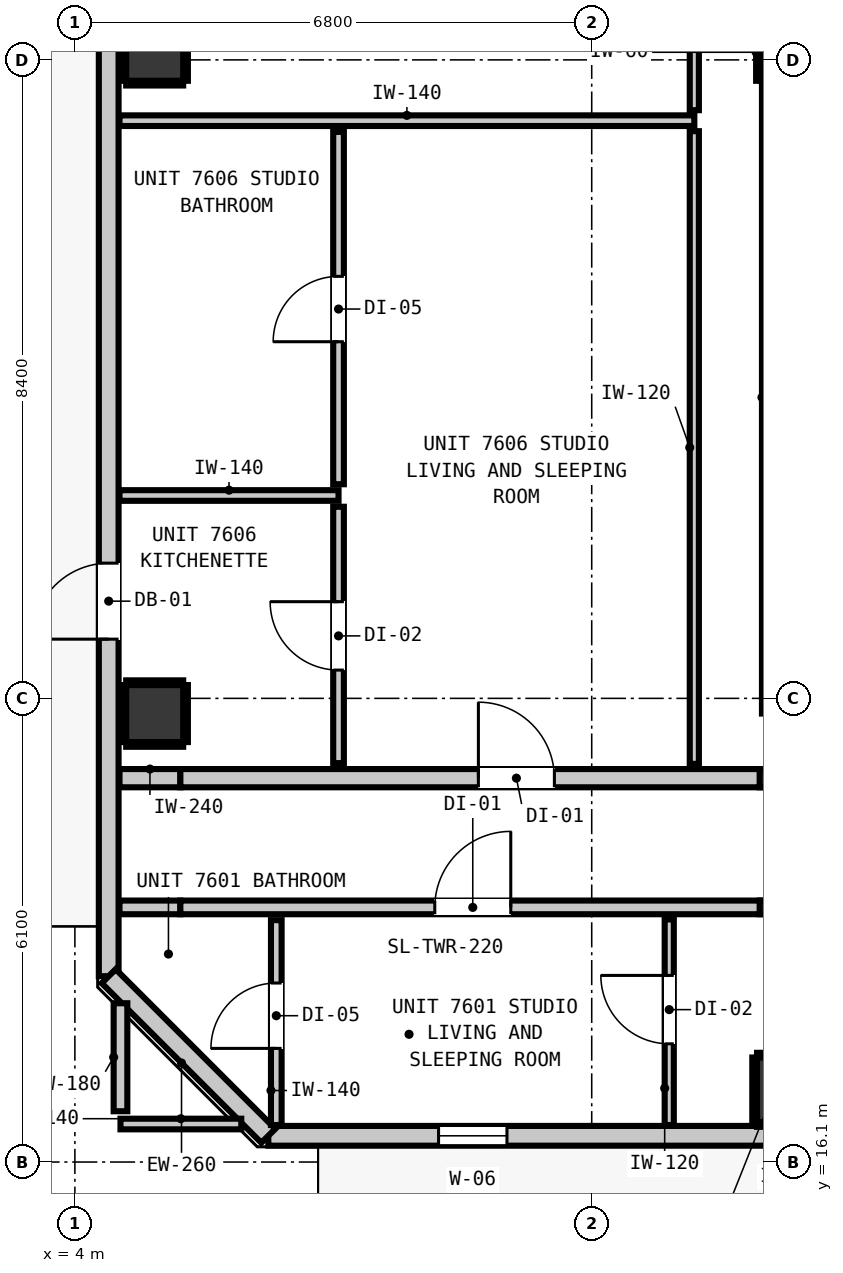
"""IFC4 building model, lengths in metres.
Left out: names, types, materials, properties, quantities, classifications, styles, units other than length and angle.
Written with IfcOpenShell. Run it as: python <this file> out.ifc"""

import sys

from ifc_helpers import new_model, si_unit, direction, frame, frame_2d, origin, origin_2d, place, context, subcontext, project, spatial, rectangle, extrude, element, fill, save


model = new_model("IFC4")
c1 = context("Model", 3, precision=1e-05, world=origin(), true_north=direction((0.0, 1.0)))
c2 = subcontext(c1, "Body", "Model", "MODEL_VIEW")
j1 = project(units=[si_unit("LENGTHUNIT", "METRE"), si_unit("PLANEANGLEUNIT", "RADIAN")], contexts=[c1])
p1 = place(None, origin())
s1 = spatial("IfcSite", under=j1, at=p1, CompositionType="ELEMENT")
p2 = place(p1, origin())
s2 = spatial("IfcBuilding", under=s1, at=p2, CompositionType="ELEMENT")
p3 = place(p2, frame((0.0, 0.0, 262.24)))
s3 = spatial("IfcBuildingStorey", under=s2, at=p3, CompositionType="ELEMENT", Elevation=262.24)
p4 = place(p3, frame((13.4, 30.7, 0.0), z_axis=(0.0, 0.0, 1.0), x_axis=(1.0, 0.0, 0.0)))
e1 = element("IfcColumn", 1, at=p4, inside=s3, PredefinedType="COLUMN", context=c2, shape_type="SweptSolid", body=[
    extrude(rectangle(XDim=0.75, YDim=0.75, at=origin_2d()), origin(), (0.0, 0.0, 1.0), 3.32),
])
p5 = place(p3, frame((13.44, 22.0, 0.0), z_axis=(0.0, 0.0, 1.0), x_axis=(0.0, 1.0, 0.0)))
e2 = element("IfcWall", 2, at=p5, inside=s3, PredefinedType="SHEAR", context=c2, shape_type="SweptSolid", body=[
    extrude(rectangle(XDim=8.32, YDim=0.8, at=frame_2d((4.16, 0.0))), origin(), (0.0, 0.0, 1.0), 3.32),
])
p6 = place(p3, frame((13.4, 17.05, 0.0), z_axis=(0.0, 0.0, 1.0), x_axis=(1.0, 0.0, 0.0)))
e3 = element("IfcColumn", 3, at=p6, inside=s3, PredefinedType="COLUMN", context=c2, shape_type="SweptSolid", body=[
    extrude(rectangle(XDim=0.85, YDim=0.85, at=origin_2d()), origin(), (0.0, 0.0, 1.0), 3.32),
])
for number, where, z_axis, x_axis in (
    (4, (5.05, 22.0, 0.0), (0.0, 0.0, 1.0), (1.0, 0.0, 0.0)),
    (5, (5.05, 30.7, 0.0), (0.0, 0.0, 1.0), (1.0, 0.0, 0.0)),
):
    element("IfcColumn", number, at=place(p3, frame(where, z_axis=z_axis, x_axis=x_axis)), inside=s3, PredefinedType="COLUMN", context=c2, shape_type="SweptSolid", body=[
        extrude(rectangle(XDim=0.75, YDim=0.75, at=origin_2d()), origin(), (0.0, 0.0, 1.0), 3.32),
    ])
p7 = place(p3, frame((4.445, 18.545, 0.0), z_axis=(0.0, 0.0, 1.0), x_axis=(0.0, 1.0, 0.0)))
e6 = element("IfcWall", 6, at=p7, inside=s3, PredefinedType="STANDARD", context=c2, shape_type="SweptSolid", body=[
    extrude(rectangle(XDim=30.31, YDim=0.26, at=frame_2d((15.155, 0.0))), origin(), (0.0, 0.0, 1.0), 3.1),
])
p8 = place(p7, frame((4.434, 0.0, 0.0)))
e7 = element("IfcOpeningElement", 7, at=p8, cuts=e6, PredefinedType="OPENING", context=c2, shape_type="SweptSolid", body=[
    extrude(rectangle(XDim=1.0, YDim=2.15, at=frame_2d((0.5, 1.075))), frame((0.0, 0.14, 0.0), z_axis=(0.0, -1.0, 0.0), x_axis=(1.0, 0.0, 0.0)), (0.0, 0.0, 1.0), 0.28),
])
p9 = place(p7, frame((28.316, 0.0, 0.85)))
e8 = element("IfcOpeningElement", 8, at=p9, cuts=e6, PredefinedType="OPENING", context=c2, shape_type="SweptSolid", body=[
    extrude(rectangle(XDim=0.9, YDim=1.5, at=frame_2d((0.45, 0.75))), frame((0.0, 0.14, 0.0), z_axis=(0.0, -1.0, 0.0), x_axis=(1.0, 0.0, 0.0)), (0.0, 0.0, 1.0), 0.28),
])
p10 = place(p7, frame((16.055, 0.0, 0.85)))
e9 = element("IfcOpeningElement", 9, at=p10, cuts=e6, PredefinedType="OPENING", context=c2, shape_type="SweptSolid", body=[
    extrude(rectangle(XDim=0.9, YDim=1.5, at=frame_2d((0.45, 0.75))), frame((0.0, 0.14, 0.0), z_axis=(0.0, -1.0, 0.0), x_axis=(1.0, 0.0, 0.0)), (0.0, 0.0, 1.0), 0.28),
])
p11 = place(p3, frame((39.255, 16.445, 0.0), z_axis=(0.0, 0.0, 1.0), x_axis=(-1.0, 0.0, 0.0)))
e10 = element("IfcWall", 10, at=p11, inside=s3, PredefinedType="STANDARD", context=c2, shape_type="SweptSolid", body=[
    extrude(rectangle(XDim=32.71, YDim=0.26, at=frame_2d((16.355, 0.0))), origin(), (0.0, 0.0, 1.0), 3.1),
])
p12 = place(p11, frame((0.907, 0.0, 0.0)))
e11 = element("IfcOpeningElement", 11, at=p12, cuts=e10, PredefinedType="OPENING", context=c2, shape_type="SweptSolid", body=[
    extrude(rectangle(XDim=1.0, YDim=2.15, at=frame_2d((0.5, 1.075))), frame((0.0, 0.14, 0.0), z_axis=(0.0, -1.0, 0.0), x_axis=(1.0, 0.0, 0.0)), (0.0, 0.0, 1.0), 0.28),
])
p13 = place(p11, frame((29.57, 0.0, 0.85)))
e12 = element("IfcOpeningElement", 12, at=p13, cuts=e10, PredefinedType="OPENING", context=c2, shape_type="SweptSolid", body=[
    extrude(rectangle(XDim=0.9, YDim=1.5, at=frame_2d((0.45, 0.75))), frame((0.0, 0.14, 0.0), z_axis=(0.0, -1.0, 0.0), x_axis=(1.0, 0.0, 0.0)), (0.0, 0.0, 1.0), 0.28),
])
p14 = place(p11, frame((15.558, 0.0, 0.85)))
e13 = element("IfcOpeningElement", 13, at=p14, cuts=e10, PredefinedType="OPENING", context=c2, shape_type="SweptSolid", body=[
    extrude(rectangle(XDim=0.9, YDim=1.5, at=frame_2d((0.45, 0.75))), frame((0.0, 0.14, 0.0), z_axis=(0.0, -1.0, 0.0), x_axis=(1.0, 0.0, 0.0)), (0.0, 0.0, 1.0), 0.28),
])
p15 = place(p11, frame((5.328, 0.0, 0.85)))
e14 = element("IfcOpeningElement", 14, at=p15, cuts=e10, PredefinedType="OPENING", context=c2, shape_type="SweptSolid", body=[
    extrude(rectangle(XDim=0.9, YDim=1.5, at=frame_2d((0.45, 0.75))), frame((0.0, 0.14, 0.0), z_axis=(0.0, -1.0, 0.0), x_axis=(1.0, 0.0, 0.0)), (0.0, 0.0, 1.0), 0.28),
])
p16 = place(p3, frame((6.545, 16.445, 0.0), z_axis=(0.0, 0.0, 1.0), x_axis=(-0.707106781187, 0.707106781187, 0.0)))
e15 = element("IfcWall", 15, at=p16, inside=s3, PredefinedType="STANDARD", context=c2, shape_type="SweptSolid", body=[
    extrude(rectangle(XDim=2.97, YDim=0.26, at=frame_2d((1.485, 0.0))), origin(), (0.0, 0.0, 1.0), 3.1),
])
p17 = place(p3, frame((4.587, 21.15, 0.0), z_axis=(0.0, 0.0, 1.0), x_axis=(1.0, 0.0, 0.0)))
e16 = element("IfcWall", 16, at=p17, inside=s3, PredefinedType="PARTITIONING", context=c2, shape_type="SweptSolid", body=[
    extrude(rectangle(XDim=0.801, YDim=0.24, at=frame_2d((0.4, 0.0))), origin(), (0.0, 0.0, 1.0), 3.1),
])
p18 = place(p3, frame((5.388, 21.15, 0.0), z_axis=(0.0, 0.0, 1.0), x_axis=(1.0, 0.0, 0.0)))
e17 = element("IfcWall", 17, at=p18, inside=s3, PredefinedType="PARTITIONING", context=c2, shape_type="SweptSolid", body=[
    extrude(rectangle(XDim=7.624, YDim=0.24, at=frame_2d((3.812, 0.0))), origin(), (0.0, 0.0, 1.0), 2.477),
])
p19 = place(p18, frame((3.921, 0.0, 0.0)))
e18 = element("IfcOpeningElement", 18, at=p19, cuts=e17, PredefinedType="OPENING", context=c2, shape_type="SweptSolid", body=[
    extrude(rectangle(XDim=1.0, YDim=2.15, at=frame_2d((0.5, 1.075))), frame((0.0, 0.13, 0.0), z_axis=(0.0, -1.0, 0.0), x_axis=(1.0, 0.0, 0.0)), (0.0, 0.0, 1.0), 0.26),
])
p20 = place(p3, frame((13.012, 21.15, 0.0), z_axis=(0.0, 0.0, 1.0), x_axis=(1.0, 0.0, 0.0)))
e19 = element("IfcWall", 19, at=p20, inside=s3, PredefinedType="PARTITIONING", context=c2, shape_type="SweptSolid", body=[
    extrude(rectangle(XDim=28.201, YDim=0.24, at=frame_2d((14.101, 0.0))), origin(), (0.0, 0.0, 1.0), 3.1),
])
p21 = place(p20, frame((5.198, 0.0, 0.0)))
e20 = element("IfcOpeningElement", 20, at=p21, cuts=e19, PredefinedType="OPENING", context=c2, shape_type="SweptSolid", body=[
    extrude(rectangle(XDim=1.1, YDim=2.15, at=frame_2d((0.55, 1.075))), frame((0.0, 0.13, 0.0), z_axis=(0.0, -1.0, 0.0), x_axis=(1.0, 0.0, 0.0)), (0.0, 0.0, 1.0), 0.26),
])
p22 = place(p3, frame((4.587, 19.45, 0.0), z_axis=(0.0, 0.0, 1.0), x_axis=(1.0, 0.0, 0.0)))
e21 = element("IfcWall", 21, at=p22, inside=s3, PredefinedType="PARTITIONING", context=c2, shape_type="SweptSolid", body=[
    extrude(rectangle(XDim=0.801, YDim=0.18, at=frame_2d((0.4, 0.0))), origin(), (0.0, 0.0, 1.0), 3.1),
])
p23 = place(p3, frame((5.388, 19.45, 0.0), z_axis=(0.0, 0.0, 1.0), x_axis=(1.0, 0.0, 0.0)))
e22 = element("IfcWall", 22, at=p23, inside=s3, PredefinedType="PARTITIONING", context=c2, shape_type="SweptSolid", body=[
    extrude(rectangle(XDim=7.624, YDim=0.18, at=frame_2d((3.812, 0.0))), origin(), (0.0, 0.0, 1.0), 2.477),
])
p24 = place(p23, frame((3.347, 0.0, 0.0)))
e23 = element("IfcOpeningElement", 23, at=p24, cuts=e22, PredefinedType="OPENING", context=c2, shape_type="SweptSolid", body=[
    extrude(rectangle(XDim=1.0, YDim=2.15, at=frame_2d((0.5, 1.075))), frame((0.0, 0.1, 0.0), z_axis=(0.0, -1.0, 0.0), x_axis=(1.0, 0.0, 0.0)), (0.0, 0.0, 1.0), 0.2),
])
p25 = place(p3, frame((13.012, 19.45, 0.0), z_axis=(0.0, 0.0, 1.0), x_axis=(1.0, 0.0, 0.0)))
e24 = element("IfcWall", 24, at=p25, inside=s3, PredefinedType="PARTITIONING", context=c2, shape_type="SweptSolid", body=[
    extrude(rectangle(XDim=28.201, YDim=0.18, at=frame_2d((14.101, 0.0))), origin(), (0.0, 0.0, 1.0), 3.1),
])
p26 = place(p25, frame((8.329, 0.0, 0.0)))
e25 = element("IfcOpeningElement", 25, at=p26, cuts=e24, PredefinedType="OPENING", context=c2, shape_type="SweptSolid", body=[
    extrude(rectangle(XDim=1.0, YDim=2.15, at=frame_2d((0.5, 1.075))), frame((0.0, 0.1, 0.0), z_axis=(0.0, -1.0, 0.0), x_axis=(1.0, 0.0, 0.0)), (0.0, 0.0, 1.0), 0.2),
])
p27 = place(p25, frame((21.403, 0.0, 0.0)))
e26 = element("IfcOpeningElement", 26, at=p27, cuts=e24, PredefinedType="OPENING", context=c2, shape_type="SweptSolid", body=[
    extrude(rectangle(XDim=1.0, YDim=2.15, at=frame_2d((0.5, 1.075))), frame((0.0, 0.1, 0.0), z_axis=(0.0, -1.0, 0.0), x_axis=(1.0, 0.0, 0.0)), (0.0, 0.0, 1.0), 0.2),
])
p28 = place(p3, frame((4.6, 16.6, 0.0), z_axis=(0.0, 0.0, 1.0), x_axis=(1.0, 0.0, 0.0)))
e27 = element("IfcWall", 27, at=p28, inside=s3, PredefinedType="PARTITIONING", context=c2, shape_type="SweptSolid", body=[
    extrude(rectangle(XDim=1.589, YDim=0.14, at=frame_2d((0.794, 0.0))), origin(), (0.0, 0.0, 1.0), 3.1),
])
p29 = place(p3, frame((4.587, 24.869, 0.0), z_axis=(0.0, 0.0, 1.0), x_axis=(1.0, 0.0, 0.0)))
e28 = element("IfcWall", 28, at=p29, inside=s3, PredefinedType="PARTITIONING", context=c2, shape_type="SweptSolid", body=[
    extrude(rectangle(XDim=2.882, YDim=0.14, at=frame_2d((1.441, 0.0))), origin(), (0.0, 0.0, 1.0), 3.1),
])
p30 = place(p3, frame((4.587, 29.8, 0.0), z_axis=(0.0, 0.0, 1.0), x_axis=(1.0, 0.0, 0.0)))
e29 = element("IfcWall", 29, at=p30, inside=s3, PredefinedType="PARTITIONING", context=c2, shape_type="SweptSolid", body=[
    extrude(rectangle(XDim=7.563, YDim=0.14, at=frame_2d((3.781, 0.0))), origin(), (0.0, 0.0, 1.0), 3.1),
])
p31 = place(p3, frame((4.6, 16.768, 0.0), z_axis=(0.0, 0.0, 1.0), x_axis=(0.0, 1.0, 0.0)))
e30 = element("IfcWall", 30, at=p31, inside=s3, PredefinedType="PARTITIONING", context=c2, shape_type="SweptSolid", body=[
    extrude(rectangle(XDim=1.421, YDim=0.18, at=frame_2d((0.71, 0.0))), origin(), (0.0, 0.0, 1.0), 3.1),
])
p32 = place(p3, frame((6.65, 16.587, 0.0), z_axis=(0.0, 0.0, 1.0), x_axis=(0.0, 1.0, 0.0)))
e31 = element("IfcWall", 31, at=p32, inside=s3, PredefinedType="PARTITIONING", context=c2, shape_type="SweptSolid", body=[
    extrude(rectangle(XDim=2.695, YDim=0.14, at=frame_2d((1.348, 0.0))), origin(), (0.0, 0.0, 1.0), 3.1),
])
p33 = place(p32, frame((1.008, 0.0, 0.0)))
e32 = element("IfcOpeningElement", 32, at=p33, cuts=e31, PredefinedType="OPENING", context=c2, shape_type="SweptSolid", body=[
    extrude(rectangle(XDim=0.86, YDim=2.02, at=frame_2d((0.43, 1.01))), frame((0.0, 0.08, 0.0), z_axis=(0.0, -1.0, 0.0), x_axis=(1.0, 0.0, 0.0)), (0.0, 0.0, 1.0), 0.16),
])
p34 = place(p3, frame((7.469, 21.348, 0.0), z_axis=(0.0, 0.0, 1.0), x_axis=(0.0, 1.0, 0.0)))
e33 = element("IfcWall", 33, at=p34, inside=s3, PredefinedType="PARTITIONING", context=c2, shape_type="SweptSolid", body=[
    extrude(rectangle(XDim=3.373, YDim=0.14, at=frame_2d((1.687, 0.0))), origin(), (0.0, 0.0, 1.0), 3.1),
])
p35 = place(p34, frame((1.224, 0.0, 0.0)))
e34 = element("IfcOpeningElement", 34, at=p35, cuts=e33, PredefinedType="OPENING", context=c2, shape_type="SweptSolid", body=[
    extrude(rectangle(XDim=0.9, YDim=2.1, at=frame_2d((0.45, 1.05))), frame((0.0, 0.08, 0.0), z_axis=(0.0, -1.0, 0.0), x_axis=(1.0, 0.0, 0.0)), (0.0, 0.0, 1.0), 0.16),
])
p36 = place(p3, frame((7.469, 25.017, 0.0), z_axis=(0.0, 0.0, 1.0), x_axis=(0.0, 1.0, 0.0)))
e35 = element("IfcWall", 35, at=p36, inside=s3, PredefinedType="PARTITIONING", context=c2, shape_type="SweptSolid", body=[
    extrude(rectangle(XDim=4.635, YDim=0.14, at=frame_2d((2.317, 0.0))), origin(), (0.0, 0.0, 1.0), 3.1),
])
p37 = place(p36, frame((1.875, 0.0, 0.0)))
e36 = element("IfcOpeningElement", 36, at=p37, cuts=e35, PredefinedType="OPENING", context=c2, shape_type="SweptSolid", body=[
    extrude(rectangle(XDim=0.86, YDim=2.02, at=frame_2d((0.43, 1.01))), frame((0.0, 0.08, 0.0), z_axis=(0.0, -1.0, 0.0), x_axis=(1.0, 0.0, 0.0)), (0.0, 0.0, 1.0), 0.16),
])
p38 = place(p3, frame((11.82, 16.587, 0.0), z_axis=(0.0, 0.0, 1.0), x_axis=(0.0, 1.0, 0.0)))
e37 = element("IfcWall", 37, at=p38, inside=s3, PredefinedType="PARTITIONING", context=c2, shape_type="SweptSolid", body=[
    extrude(rectangle(XDim=2.705, YDim=0.12, at=frame_2d((1.353, 0.0))), origin(), (0.0, 0.0, 1.0), 3.1),
])
p39 = place(p38, frame((1.068, 0.0, 0.0)))
e38 = element("IfcOpeningElement", 38, at=p39, cuts=e37, PredefinedType="OPENING", context=c2, shape_type="SweptSolid", body=[
    extrude(rectangle(XDim=0.9, YDim=2.1, at=frame_2d((0.45, 1.05))), frame((0.0, 0.07, 0.0), z_axis=(0.0, -1.0, 0.0), x_axis=(1.0, 0.0, 0.0)), (0.0, 0.0, 1.0), 0.14),
])
p40 = place(p3, frame((12.15, 21.338, 0.0), z_axis=(0.0, 0.0, 1.0), x_axis=(0.0, 1.0, 0.0)))
e39 = element("IfcWall", 39, at=p40, inside=s3, PredefinedType="PARTITIONING", context=c2, shape_type="SweptSolid", body=[
    extrude(rectangle(XDim=8.324, YDim=0.12, at=frame_2d((4.162, 0.0))), origin(), (0.0, 0.0, 1.0), 3.1),
])
p41 = place(p3, frame((12.15, 29.938, 0.0), z_axis=(0.0, 0.0, 1.0), x_axis=(0.0, 1.0, 0.0)))
e40 = element("IfcWall", 40, at=p41, inside=s3, PredefinedType="PARTITIONING", context=c2, shape_type="SweptSolid", body=[
    extrude(rectangle(XDim=10.154, YDim=0.12, at=frame_2d((5.077, 0.0))), origin(), (0.0, 0.0, 1.0), 3.1),
])
p42 = place(p3, frame((12.993, 30.325, 0.0), z_axis=(0.0, 0.0, 1.0), x_axis=(0.0, 1.0, 0.0)))
e41 = element("IfcWall", 41, at=p42, inside=s3, PredefinedType="PARTITIONING", context=c2, shape_type="SweptSolid", body=[
    extrude(rectangle(XDim=0.75, YDim=0.06, at=frame_2d((0.375, 0.0))), origin(), (0.0, 0.0, 1.0), 1.45),
])
for number, where, z_axis, x_axis in (
    (42, (12.975, 16.593, 0.0), (0.0, 0.0, 1.0), (1.0, 0.0, 0.0)),
    (43, (12.975, 17.507, 0.0), (0.0, 0.0, 1.0), (1.0, 0.0, 0.0)),
):
    element("IfcWall", number, at=place(p3, frame(where, z_axis=z_axis, x_axis=x_axis)), inside=s3, PredefinedType="PARTITIONING", context=c2, shape_type="SweptSolid", body=[
        extrude(rectangle(XDim=0.85, YDim=0.06, at=frame_2d((0.425, 0.0))), origin(), (0.0, 0.0, 1.0), 1.45),
    ])
p43 = place(p3, frame((12.943, 16.625, 0.0), z_axis=(0.0, 0.0, 1.0), x_axis=(0.0, 1.0, 0.0)))
e44 = element("IfcWall", 44, at=p43, inside=s3, PredefinedType="PARTITIONING", context=c2, shape_type="SweptSolid", body=[
    extrude(rectangle(XDim=0.85, YDim=0.06, at=frame_2d((0.425, 0.0))), origin(), (0.0, 0.0, 1.0), 1.45),
])
for number, where, z_axis, x_axis in (
    (45, (4.675, 21.593, 0.0), (0.0, 0.0, 1.0), (1.0, 0.0, 0.0)),
    (46, (4.675, 22.407, 0.0), (0.0, 0.0, 1.0), (1.0, 0.0, 0.0)),
    (47, (4.643, 21.625, 0.0), (0.0, 0.0, 1.0), (0.0, 1.0, 0.0)),
    (48, (5.457, 21.625, 0.0), (0.0, 0.0, 1.0), (0.0, 1.0, 0.0)),
    (49, (4.675, 30.293, 0.0), (0.0, 0.0, 1.0), (1.0, 0.0, 0.0)),
    (50, (4.643, 30.325, 0.0), (0.0, 0.0, 1.0), (0.0, 1.0, 0.0)),
    (51, (5.457, 30.325, 0.0), (0.0, 0.0, 1.0), (0.0, 1.0, 0.0)),
):
    element("IfcWall", number, at=place(p3, frame(where, z_axis=z_axis, x_axis=x_axis)), inside=s3, PredefinedType="PARTITIONING", context=c2, shape_type="SweptSolid", body=[
        extrude(rectangle(XDim=0.75, YDim=0.06, at=frame_2d((0.375, 0.0))), origin(), (0.0, 0.0, 1.0), 1.45),
    ])
p44 = place(p8, origin())
e52 = element("IfcDoor", 52, at=p44, inside=s3, OperationType="SINGLE_SWING_LEFT", PredefinedType="DOOR", context=c2, shape_type="SweptSolid", body=[
    extrude(rectangle(XDim=1.0, YDim=2.15, at=frame_2d((0.5, 1.075))), frame((0.0, 0.025, 0.0), z_axis=(0.0, -1.0, 0.0), x_axis=(1.0, 0.0, 0.0)), (0.0, 0.0, 1.0), 0.05),
])
fill(e7, e52)
p45 = place(p13, origin())
e53 = element("IfcWindow", 53, at=p45, inside=s3, PartitioningType="SINGLE_PANEL", PredefinedType="WINDOW", context=c2, shape_type="SweptSolid", body=[
    extrude(rectangle(XDim=0.9, YDim=1.5, at=frame_2d((0.45, 0.75))), frame((0.0, 0.03, 0.0), z_axis=(0.0, -1.0, 0.0), x_axis=(1.0, 0.0, 0.0)), (0.0, 0.0, 1.0), 0.06),
])
fill(e12, e53)
p46 = place(p24, origin())
e54 = element("IfcDoor", 54, at=p46, inside=s3, OperationType="SINGLE_SWING_RIGHT", PredefinedType="DOOR", context=c2, shape_type="SweptSolid", body=[
    extrude(rectangle(XDim=1.0, YDim=2.15, at=frame_2d((0.5, 1.075))), frame((0.0, 0.025, 0.0), z_axis=(0.0, -1.0, 0.0), x_axis=(1.0, 0.0, 0.0)), (0.0, 0.0, 1.0), 0.05),
])
fill(e23, e54)
p47 = place(p33, origin())
e55 = element("IfcDoor", 55, at=p47, inside=s3, OperationType="SINGLE_SWING_LEFT", PredefinedType="DOOR", context=c2, shape_type="SweptSolid", body=[
    extrude(rectangle(XDim=0.86, YDim=2.02, at=frame_2d((0.43, 1.01))), frame((0.0, 0.025, 0.0), z_axis=(0.0, -1.0, 0.0), x_axis=(1.0, 0.0, 0.0)), (0.0, 0.0, 1.0), 0.05),
])
fill(e32, e55)
p48 = place(p39, origin())
e56 = element("IfcDoor", 56, at=p48, inside=s3, OperationType="SINGLE_SWING_RIGHT", PredefinedType="DOOR", context=c2, shape_type="SweptSolid", body=[
    extrude(rectangle(XDim=0.9, YDim=2.1, at=frame_2d((0.45, 1.05))), frame((0.0, 0.025, 0.0), z_axis=(0.0, -1.0, 0.0), x_axis=(1.0, 0.0, 0.0)), (0.0, 0.0, 1.0), 0.05),
])
fill(e38, e56)
p49 = place(p19, origin())
e57 = element("IfcDoor", 57, at=p49, inside=s3, OperationType="SINGLE_SWING_LEFT", PredefinedType="DOOR", context=c2, shape_type="SweptSolid", body=[
    extrude(rectangle(XDim=1.0, YDim=2.15, at=frame_2d((0.5, 1.075))), frame((0.0, 0.025, 0.0), z_axis=(0.0, -1.0, 0.0), x_axis=(1.0, 0.0, 0.0)), (0.0, 0.0, 1.0), 0.05),
])
fill(e18, e57)
p50 = place(p35, origin())
e58 = element("IfcDoor", 58, at=p50, inside=s3, OperationType="SINGLE_SWING_RIGHT", PredefinedType="DOOR", context=c2, shape_type="SweptSolid", body=[
    extrude(rectangle(XDim=0.9, YDim=2.1, at=frame_2d((0.45, 1.05))), frame((0.0, 0.025, 0.0), z_axis=(0.0, -1.0, 0.0), x_axis=(1.0, 0.0, 0.0)), (0.0, 0.0, 1.0), 0.05),
])
fill(e34, e58)
p51 = place(p37, origin())
e59 = element("IfcDoor", 59, at=p51, inside=s3, OperationType="SINGLE_SWING_LEFT", PredefinedType="DOOR", context=c2, shape_type="SweptSolid", body=[
    extrude(rectangle(XDim=0.86, YDim=2.02, at=frame_2d((0.43, 1.01))), frame((0.0, 0.025, 0.0), z_axis=(0.0, -1.0, 0.0), x_axis=(1.0, 0.0, 0.0)), (0.0, 0.0, 1.0), 0.05),
])
fill(e36, e59)
save(model, sys.argv[1])
